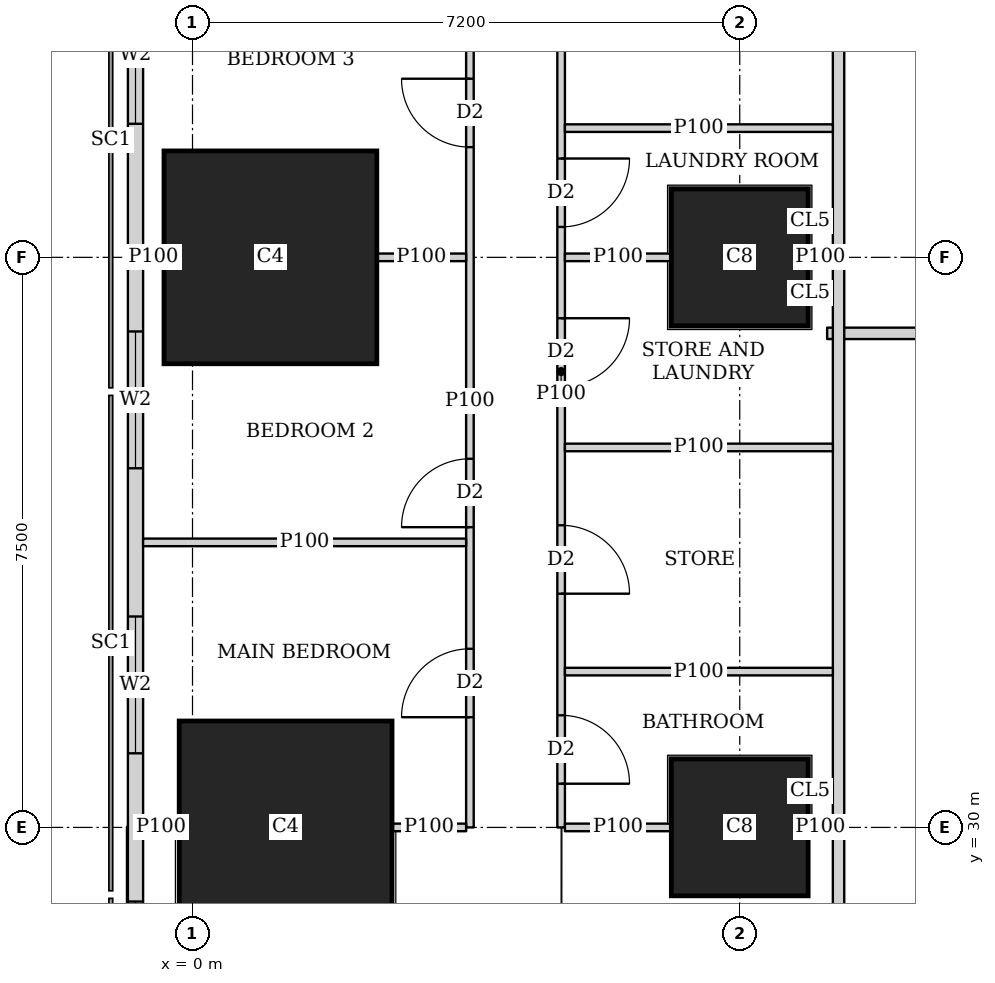
"""IFC4 building model, lengths in metres.
Left out: names, types, materials, properties, quantities, classifications, styles, units other than length and angle.
Written with IfcOpenShell. Run it as: python <this file> out.ifc"""

import sys

from ifc_helpers import new_model, si_unit, direction, frame, frame_2d, origin, origin_2d, place, context, subcontext, project, spatial, rectangle, extrude, element, fill, save


model = new_model("IFC4")
c1 = context("Model", 3, precision=1e-05, world=origin(), true_north=direction((0.0, 1.0)))
c2 = subcontext(c1, "Body", "Model", "MODEL_VIEW")
j1 = project(units=[si_unit("LENGTHUNIT", "METRE"), si_unit("PLANEANGLEUNIT", "RADIAN")], contexts=[c1])
p1 = place(None, origin())
s1 = spatial("IfcSite", under=j1, at=p1, CompositionType="ELEMENT")
p2 = place(p1, origin())
s2 = spatial("IfcBuilding", under=s1, at=p2, CompositionType="ELEMENT")
p3 = place(p2, frame((0.0, 0.0, 65.0)))
s3 = spatial("IfcBuildingStorey", under=s2, at=p3, CompositionType="ELEMENT", Elevation=65.0)
p4 = place(p3, frame((1.225, 30.0, 0.0), z_axis=(0.0, 0.0, 1.0), x_axis=(1.0, 0.0, 0.0)))
e1 = element("IfcColumn", 1, at=p4, inside=s3, PredefinedType="COLUMN", context=c2, shape_type="SweptSolid", body=[
    extrude(rectangle(XDim=2.8, YDim=2.8, at=origin_2d()), origin(), (0.0, 0.0, 1.0), 3.75),
])
p5 = place(p3, frame((7.2, 30.0, 0.0), z_axis=(0.0, 0.0, 1.0), x_axis=(1.0, 0.0, 0.0)))
e2 = element("IfcColumn", 2, at=p5, inside=s3, PredefinedType="COLUMN", context=c2, shape_type="SweptSolid", body=[
    extrude(rectangle(XDim=1.8, YDim=1.8, at=origin_2d()), origin(), (0.0, 0.0, 1.0), 3.75),
])
p6 = place(p3, frame((1.025, 37.5, 0.0), z_axis=(0.0, 0.0, 1.0), x_axis=(1.0, 0.0, 0.0)))
e3 = element("IfcColumn", 3, at=p6, inside=s3, PredefinedType="COLUMN", context=c2, shape_type="SweptSolid", body=[
    extrude(rectangle(XDim=2.8, YDim=2.8, at=origin_2d()), origin(), (0.0, 0.0, 1.0), 3.75),
])
p7 = place(p3, frame((7.2, 37.5, 0.0), z_axis=(0.0, 0.0, 1.0), x_axis=(1.0, 0.0, 0.0)))
e4 = element("IfcColumn", 4, at=p7, inside=s3, PredefinedType="COLUMN", context=c2, shape_type="SweptSolid", body=[
    extrude(rectangle(XDim=1.8, YDim=1.8, at=origin_2d()), origin(), (0.0, 0.0, 1.0), 3.75),
])
p8 = place(p3, frame((-0.75, 42.837, 0.0), z_axis=(0.0, 0.0, 1.0), x_axis=(0.0, -1.0, 0.0)))
e5 = element("IfcWall", 5, at=p8, inside=s3, PredefinedType="SOLIDWALL", context=c2, shape_type="SweptSolid", body=[
    extrude(rectangle(XDim=40.674, YDim=0.2, at=frame_2d((20.337, 0.0))), origin(), (0.0, 0.0, 1.0), 3.5),
])
p9 = place(p8, frame((1.78, 0.0, 0.9)))
e6 = element("IfcOpeningElement", 6, at=p9, cuts=e5, PredefinedType="OPENING", context=c2, shape_type="SweptSolid", body=[
    extrude(rectangle(XDim=1.8, YDim=1.5, at=frame_2d((0.9, 0.75))), frame((0.0, 0.11, 0.0), z_axis=(0.0, -1.0, 0.0), x_axis=(1.0, 0.0, 0.0)), (0.0, 0.0, 1.0), 0.22),
])
p10 = place(p8, frame((6.312, 0.0, 0.9)))
e7 = element("IfcOpeningElement", 7, at=p10, cuts=e5, PredefinedType="OPENING", context=c2, shape_type="SweptSolid", body=[
    extrude(rectangle(XDim=1.8, YDim=1.5, at=frame_2d((0.9, 0.75))), frame((0.0, 0.11, 0.0), z_axis=(0.0, -1.0, 0.0), x_axis=(1.0, 0.0, 0.0)), (0.0, 0.0, 1.0), 0.22),
])
p11 = place(p8, frame((10.062, 0.0, 0.9)))
e8 = element("IfcOpeningElement", 8, at=p11, cuts=e5, PredefinedType="OPENING", context=c2, shape_type="SweptSolid", body=[
    extrude(rectangle(XDim=1.8, YDim=1.5, at=frame_2d((0.9, 0.75))), frame((0.0, 0.11, 0.0), z_axis=(0.0, -1.0, 0.0), x_axis=(1.0, 0.0, 0.0)), (0.0, 0.0, 1.0), 0.22),
])
p12 = place(p8, frame((13.812, 0.0, 0.9)))
e9 = element("IfcOpeningElement", 9, at=p12, cuts=e5, PredefinedType="OPENING", context=c2, shape_type="SweptSolid", body=[
    extrude(rectangle(XDim=1.8, YDim=1.5, at=frame_2d((0.9, 0.75))), frame((0.0, 0.11, 0.0), z_axis=(0.0, -1.0, 0.0), x_axis=(1.0, 0.0, 0.0)), (0.0, 0.0, 1.0), 0.22),
])
p13 = place(p8, frame((17.562, 0.0, 0.9)))
e10 = element("IfcOpeningElement", 10, at=p13, cuts=e5, PredefinedType="OPENING", context=c2, shape_type="SweptSolid", body=[
    extrude(rectangle(XDim=1.8, YDim=1.5, at=frame_2d((0.9, 0.75))), frame((0.0, 0.11, 0.0), z_axis=(0.0, -1.0, 0.0), x_axis=(1.0, 0.0, 0.0)), (0.0, 0.0, 1.0), 0.22),
])
p14 = place(p8, frame((21.312, 0.0, 0.9)))
e11 = element("IfcOpeningElement", 11, at=p14, cuts=e5, PredefinedType="OPENING", context=c2, shape_type="SweptSolid", body=[
    extrude(rectangle(XDim=1.8, YDim=1.5, at=frame_2d((0.9, 0.75))), frame((0.0, 0.11, 0.0), z_axis=(0.0, -1.0, 0.0), x_axis=(1.0, 0.0, 0.0)), (0.0, 0.0, 1.0), 0.22),
])
p15 = place(p8, frame((25.062, 0.0, 0.9)))
e12 = element("IfcOpeningElement", 12, at=p15, cuts=e5, PredefinedType="OPENING", context=c2, shape_type="SweptSolid", body=[
    extrude(rectangle(XDim=1.8, YDim=1.5, at=frame_2d((0.9, 0.75))), frame((0.0, 0.11, 0.0), z_axis=(0.0, -1.0, 0.0), x_axis=(1.0, 0.0, 0.0)), (0.0, 0.0, 1.0), 0.22),
])
p16 = place(p8, frame((28.812, 0.0, 0.9)))
e13 = element("IfcOpeningElement", 13, at=p16, cuts=e5, PredefinedType="OPENING", context=c2, shape_type="SweptSolid", body=[
    extrude(rectangle(XDim=1.8, YDim=1.5, at=frame_2d((0.9, 0.75))), frame((0.0, 0.11, 0.0), z_axis=(0.0, -1.0, 0.0), x_axis=(1.0, 0.0, 0.0)), (0.0, 0.0, 1.0), 0.22),
])
p17 = place(p8, frame((32.562, 0.0, 0.9)))
e14 = element("IfcOpeningElement", 14, at=p17, cuts=e5, PredefinedType="OPENING", context=c2, shape_type="SweptSolid", body=[
    extrude(rectangle(XDim=1.8, YDim=1.5, at=frame_2d((0.9, 0.75))), frame((0.0, 0.11, 0.0), z_axis=(0.0, -1.0, 0.0), x_axis=(1.0, 0.0, 0.0)), (0.0, 0.0, 1.0), 0.22),
])
p18 = place(p8, frame((37.094, 0.0, 0.9)))
e15 = element("IfcOpeningElement", 15, at=p18, cuts=e5, PredefinedType="OPENING", context=c2, shape_type="SweptSolid", body=[
    extrude(rectangle(XDim=1.8, YDim=1.5, at=frame_2d((0.9, 0.75))), frame((0.0, 0.11, 0.0), z_axis=(0.0, -1.0, 0.0), x_axis=(1.0, 0.0, 0.0)), (0.0, 0.0, 1.0), 0.22),
])
p19 = place(p3, frame((8.5, 2.426, 0.0), z_axis=(0.0, 0.0, 1.0), x_axis=(0.0, 1.0, 0.0)))
e16 = element("IfcWall", 16, at=p19, inside=s3, PredefinedType="SOLIDWALL", context=c2, shape_type="SweptSolid", body=[
    extrude(rectangle(XDim=40.173, YDim=0.15, at=frame_2d((20.086, 0.0))), origin(), (0.0, 0.0, 1.0), 3.5),
])
p20 = place(p19, frame((6.661, 0.0, 0.0)))
e17 = element("IfcOpeningElement", 17, at=p20, cuts=e16, PredefinedType="OPENING", context=c2, shape_type="SweptSolid", body=[
    extrude(rectangle(XDim=1.0, YDim=2.1, at=frame_2d((0.5, 1.05))), frame((0.0, 0.085, 0.0), z_axis=(0.0, -1.0, 0.0), x_axis=(1.0, 0.0, 0.0)), (0.0, 0.0, 1.0), 0.17),
])
p21 = place(p19, frame((9.986, 0.0, 0.0)))
e18 = element("IfcOpeningElement", 18, at=p21, cuts=e16, PredefinedType="OPENING", context=c2, shape_type="SweptSolid", body=[
    extrude(rectangle(XDim=1.0, YDim=2.1, at=frame_2d((0.5, 1.05))), frame((0.0, 0.085, 0.0), z_axis=(0.0, -1.0, 0.0), x_axis=(1.0, 0.0, 0.0)), (0.0, 0.0, 1.0), 0.17),
])
p22 = place(p19, frame((17.487, 0.0, 0.0)))
e19 = element("IfcOpeningElement", 19, at=p22, cuts=e16, PredefinedType="OPENING", context=c2, shape_type="SweptSolid", body=[
    extrude(rectangle(XDim=1.0, YDim=2.1, at=frame_2d((0.5, 1.05))), frame((0.0, 0.085, 0.0), z_axis=(0.0, -1.0, 0.0), x_axis=(1.0, 0.0, 0.0)), (0.0, 0.0, 1.0), 0.17),
])
p23 = place(p19, frame((24.987, 0.0, 0.0)))
e20 = element("IfcOpeningElement", 20, at=p23, cuts=e16, PredefinedType="OPENING", context=c2, shape_type="SweptSolid", body=[
    extrude(rectangle(XDim=1.0, YDim=2.1, at=frame_2d((0.5, 1.05))), frame((0.0, 0.085, 0.0), z_axis=(0.0, -1.0, 0.0), x_axis=(1.0, 0.0, 0.0)), (0.0, 0.0, 1.0), 0.17),
])
p24 = place(p3, frame((8.35, 36.5, 0.0), z_axis=(0.0, 0.0, 1.0), x_axis=(1.0, 0.0, 0.0)))
e21 = element("IfcWall", 21, at=p24, inside=s3, PredefinedType="SOLIDWALL", context=c2, shape_type="SweptSolid", body=[
    extrude(rectangle(XDim=26.415, YDim=0.15, at=frame_2d((13.208, 0.0))), origin(), (0.0, 0.0, 1.0), 3.5),
])
p25 = place(p24, frame((2.6, 0.0, 0.0)))
e22 = element("IfcOpeningElement", 22, at=p25, cuts=e21, PredefinedType="OPENING", context=c2, shape_type="SweptSolid", body=[
    extrude(rectangle(XDim=1.0, YDim=2.1, at=frame_2d((0.5, 1.05))), frame((0.0, 0.085, 0.0), z_axis=(0.0, -1.0, 0.0), x_axis=(1.0, 0.0, 0.0)), (0.0, 0.0, 1.0), 0.17),
])
p26 = place(p24, frame((10.949, 0.0, 0.0)))
e23 = element("IfcOpeningElement", 23, at=p26, cuts=e21, PredefinedType="OPENING", context=c2, shape_type="SweptSolid", body=[
    extrude(rectangle(XDim=1.0, YDim=2.1, at=frame_2d((0.5, 1.05))), frame((0.0, 0.085, 0.0), z_axis=(0.0, -1.0, 0.0), x_axis=(1.0, 0.0, 0.0)), (0.0, 0.0, 1.0), 0.17),
])
p27 = place(p24, frame((18.149, 0.0, 0.0)))
e24 = element("IfcOpeningElement", 24, at=p27, cuts=e21, PredefinedType="OPENING", context=c2, shape_type="SweptSolid", body=[
    extrude(rectangle(XDim=1.0, YDim=2.1, at=frame_2d((0.5, 1.05))), frame((0.0, 0.085, 0.0), z_axis=(0.0, -1.0, 0.0), x_axis=(1.0, 0.0, 0.0)), (0.0, 0.0, 1.0), 0.17),
])
p28 = place(p3, frame((3.65, 30.0, 0.0), z_axis=(0.0, 0.0, 1.0), x_axis=(0.0, 1.0, 0.0)))
e25 = element("IfcWall", 25, at=p28, inside=s3, PredefinedType="PARTITIONING", context=c2, shape_type="SweptSolid", body=[
    extrude(rectangle(XDim=11.213, YDim=0.1, at=frame_2d((5.606, 0.0))), origin(), (0.0, 0.0, 1.0), 3.5),
])
p29 = place(p28, frame((1.45, 0.0, 0.0)))
e26 = element("IfcOpeningElement", 26, at=p29, cuts=e25, PredefinedType="OPENING", context=c2, shape_type="SweptSolid", body=[
    extrude(rectangle(XDim=0.9, YDim=2.1, at=frame_2d((0.45, 1.05))), frame((0.0, 0.06, 0.0), z_axis=(0.0, -1.0, 0.0), x_axis=(1.0, 0.0, 0.0)), (0.0, 0.0, 1.0), 0.12),
])
p30 = place(p28, frame((3.95, 0.0, 0.0)))
e27 = element("IfcOpeningElement", 27, at=p30, cuts=e25, PredefinedType="OPENING", context=c2, shape_type="SweptSolid", body=[
    extrude(rectangle(XDim=0.9, YDim=2.1, at=frame_2d((0.45, 1.05))), frame((0.0, 0.06, 0.0), z_axis=(0.0, -1.0, 0.0), x_axis=(1.0, 0.0, 0.0)), (0.0, 0.0, 1.0), 0.12),
])
p31 = place(p28, frame((8.95, 0.0, 0.0)))
e28 = element("IfcOpeningElement", 28, at=p31, cuts=e25, PredefinedType="OPENING", context=c2, shape_type="SweptSolid", body=[
    extrude(rectangle(XDim=0.9, YDim=2.1, at=frame_2d((0.45, 1.05))), frame((0.0, 0.06, 0.0), z_axis=(0.0, -1.0, 0.0), x_axis=(1.0, 0.0, 0.0)), (0.0, 0.0, 1.0), 0.12),
])
p32 = place(p3, frame((4.85, 30.0, 0.0), z_axis=(0.0, 0.0, 1.0), x_axis=(0.0, 1.0, 0.0)))
e29 = element("IfcWall", 29, at=p32, inside=s3, PredefinedType="PARTITIONING", context=c2, shape_type="SweptSolid", body=[
    extrude(rectangle(XDim=11.994, YDim=0.1, at=frame_2d((5.997, 0.0))), origin(), (0.0, 0.0, 1.0), 3.5),
])
p33 = place(p32, frame((0.575, 0.0, 0.0)))
e30 = element("IfcOpeningElement", 30, at=p33, cuts=e29, PredefinedType="OPENING", context=c2, shape_type="SweptSolid", body=[
    extrude(rectangle(XDim=0.9, YDim=2.1, at=frame_2d((0.45, 1.05))), frame((0.0, 0.06, 0.0), z_axis=(0.0, -1.0, 0.0), x_axis=(1.0, 0.0, 0.0)), (0.0, 0.0, 1.0), 0.12),
])
p34 = place(p32, frame((5.799, 0.0, 0.0)))
e31 = element("IfcOpeningElement", 31, at=p34, cuts=e29, PredefinedType="OPENING", context=c2, shape_type="SweptSolid", body=[
    extrude(rectangle(XDim=0.9, YDim=2.1, at=frame_2d((0.45, 1.05))), frame((0.0, 0.06, 0.0), z_axis=(0.0, -1.0, 0.0), x_axis=(1.0, 0.0, 0.0)), (0.0, 0.0, 1.0), 0.12),
])
p35 = place(p32, frame((7.9, 0.0, 0.0)))
e32 = element("IfcOpeningElement", 32, at=p35, cuts=e29, PredefinedType="OPENING", context=c2, shape_type="SweptSolid", body=[
    extrude(rectangle(XDim=0.9, YDim=2.1, at=frame_2d((0.45, 1.05))), frame((0.0, 0.06, 0.0), z_axis=(0.0, -1.0, 0.0), x_axis=(1.0, 0.0, 0.0)), (0.0, 0.0, 1.0), 0.12),
])
p36 = place(p32, frame((3.075, 0.0, 0.0)))
e33 = element("IfcOpeningElement", 33, at=p36, cuts=e29, PredefinedType="OPENING", context=c2, shape_type="SweptSolid", body=[
    extrude(rectangle(XDim=0.9, YDim=2.1, at=frame_2d((0.45, 1.05))), frame((0.0, 0.06, 0.0), z_axis=(0.0, -1.0, 0.0), x_axis=(1.0, 0.0, 0.0)), (0.0, 0.0, 1.0), 0.12),
])
p37 = place(p32, frame((10.3, 0.0, 0.0)))
e34 = element("IfcOpeningElement", 34, at=p37, cuts=e29, PredefinedType="OPENING", context=c2, shape_type="SweptSolid", body=[
    extrude(rectangle(XDim=0.9, YDim=2.1, at=frame_2d((0.45, 1.05))), frame((0.0, 0.06, 0.0), z_axis=(0.0, -1.0, 0.0), x_axis=(1.0, 0.0, 0.0)), (0.0, 0.0, 1.0), 0.12),
])
p38 = place(p3, frame((-0.65, 30.0, 0.0), z_axis=(0.0, 0.0, 1.0), x_axis=(1.0, 0.0, 0.0)))
e35 = element("IfcWall", 35, at=p38, inside=s3, PredefinedType="PARTITIONING", context=c2, shape_type="SweptSolid", body=[
    extrude(rectangle(XDim=0.474, YDim=0.1, at=frame_2d((0.237, 0.0))), origin(), (0.0, 0.0, 1.0), 3.5),
])
p39 = place(p3, frame((2.626, 30.0, 0.0), z_axis=(0.0, 0.0, 1.0), x_axis=(1.0, 0.0, 0.0)))
e36 = element("IfcWall", 36, at=p39, inside=s3, PredefinedType="PARTITIONING", context=c2, shape_type="SweptSolid", body=[
    extrude(rectangle(XDim=0.974, YDim=0.1, at=frame_2d((0.487, 0.0))), origin(), (0.0, 0.0, 1.0), 3.5),
])
p40 = place(p3, frame((-0.65, 33.75, 0.0), z_axis=(0.0, 0.0, 1.0), x_axis=(1.0, 0.0, 0.0)))
e37 = element("IfcWall", 37, at=p40, inside=s3, PredefinedType="PARTITIONING", context=c2, shape_type="SweptSolid", body=[
    extrude(rectangle(XDim=4.25, YDim=0.1, at=frame_2d((2.125, 0.0))), origin(), (0.0, 0.0, 1.0), 2.05),
])
p41 = place(p3, frame((-0.65, 37.5, 0.0), z_axis=(0.0, 0.0, 1.0), x_axis=(1.0, 0.0, 0.0)))
e38 = element("IfcWall", 38, at=p41, inside=s3, PredefinedType="PARTITIONING", context=c2, shape_type="SweptSolid", body=[
    extrude(rectangle(XDim=0.274, YDim=0.1, at=frame_2d((0.137, 0.0))), origin(), (0.0, 0.0, 1.0), 3.5),
])
p42 = place(p3, frame((2.426, 37.5, 0.0), z_axis=(0.0, 0.0, 1.0), x_axis=(1.0, 0.0, 0.0)))
e39 = element("IfcWall", 39, at=p42, inside=s3, PredefinedType="PARTITIONING", context=c2, shape_type="SweptSolid", body=[
    extrude(rectangle(XDim=1.174, YDim=0.1, at=frame_2d((0.587, 0.0))), origin(), (0.0, 0.0, 1.0), 2.05),
])
p43 = place(p3, frame((4.9, 30.0, 0.0), z_axis=(0.0, 0.0, 1.0), x_axis=(1.0, 0.0, 0.0)))
e40 = element("IfcWall", 40, at=p43, inside=s3, PredefinedType="PARTITIONING", context=c2, shape_type="SweptSolid", body=[
    extrude(rectangle(XDim=1.399, YDim=0.1, at=frame_2d((0.7, 0.0))), origin(), (0.0, 0.0, 1.0), 3.5),
])
p44 = place(p3, frame((8.101, 30.0, 0.0), z_axis=(0.0, 0.0, 1.0), x_axis=(1.0, 0.0, 0.0)))
e41 = element("IfcWall", 41, at=p44, inside=s3, PredefinedType="PARTITIONING", context=c2, shape_type="SweptSolid", body=[
    extrude(rectangle(XDim=0.324, YDim=0.1, at=frame_2d((0.162, 0.0))), origin(), (0.0, 0.0, 1.0), 3.5),
])
p45 = place(p3, frame((4.9, 34.999, 0.0), z_axis=(0.0, 0.0, 1.0), x_axis=(1.0, 0.0, 0.0)))
e42 = element("IfcWall", 42, at=p45, inside=s3, PredefinedType="PARTITIONING", context=c2, shape_type="SweptSolid", body=[
    extrude(rectangle(XDim=3.525, YDim=0.1, at=frame_2d((1.763, 0.0))), origin(), (0.0, 0.0, 1.0), 3.5),
])
p46 = place(p3, frame((4.9, 37.5, 0.0), z_axis=(0.0, 0.0, 1.0), x_axis=(1.0, 0.0, 0.0)))
e43 = element("IfcWall", 43, at=p46, inside=s3, PredefinedType="PARTITIONING", context=c2, shape_type="SweptSolid", body=[
    extrude(rectangle(XDim=1.399, YDim=0.1, at=frame_2d((0.7, 0.0))), origin(), (0.0, 0.0, 1.0), 3.5),
])
p47 = place(p3, frame((8.101, 37.5, 0.0), z_axis=(0.0, 0.0, 1.0), x_axis=(1.0, 0.0, 0.0)))
e44 = element("IfcWall", 44, at=p47, inside=s3, PredefinedType="PARTITIONING", context=c2, shape_type="SweptSolid", body=[
    extrude(rectangle(XDim=0.324, YDim=0.1, at=frame_2d((0.162, 0.0))), origin(), (0.0, 0.0, 1.0), 3.5),
])
for number, where, z_axis, x_axis in (
    (45, (4.9, 32.05, 0.0), (0.0, 0.0, 1.0), (1.0, 0.0, 0.0)),
    (46, (4.9, 39.2, 0.0), (0.0, 0.0, 1.0), (1.0, 0.0, 0.0)),
):
    element("IfcWall", number, at=place(p3, frame(where, z_axis=z_axis, x_axis=x_axis)), inside=s3, PredefinedType="PARTITIONING", context=c2, shape_type="SweptSolid", body=[
        extrude(rectangle(XDim=3.525, YDim=0.1, at=frame_2d((1.763, 0.0))), origin(), (0.0, 0.0, 1.0), 3.5),
    ])
p48 = place(p9, origin())
e47 = element("IfcWindow", 47, at=p48, inside=s3, PartitioningType="SINGLE_PANEL", PredefinedType="WINDOW", context=c2, shape_type="SweptSolid", body=[
    extrude(rectangle(XDim=1.8, YDim=1.5, at=frame_2d((0.9, 0.75))), frame((0.0, 0.03, 0.0), z_axis=(0.0, -1.0, 0.0), x_axis=(1.0, 0.0, 0.0)), (0.0, 0.0, 1.0), 0.06),
])
fill(e6, e47)
p49 = place(p10, origin())
e48 = element("IfcWindow", 48, at=p49, inside=s3, PartitioningType="SINGLE_PANEL", PredefinedType="WINDOW", context=c2, shape_type="SweptSolid", body=[
    extrude(rectangle(XDim=1.8, YDim=1.5, at=frame_2d((0.9, 0.75))), frame((0.0, 0.03, 0.0), z_axis=(0.0, -1.0, 0.0), x_axis=(1.0, 0.0, 0.0)), (0.0, 0.0, 1.0), 0.06),
])
fill(e7, e48)
p50 = place(p11, origin())
e49 = element("IfcWindow", 49, at=p50, inside=s3, PartitioningType="SINGLE_PANEL", PredefinedType="WINDOW", context=c2, shape_type="SweptSolid", body=[
    extrude(rectangle(XDim=1.8, YDim=1.5, at=frame_2d((0.9, 0.75))), frame((0.0, 0.03, 0.0), z_axis=(0.0, -1.0, 0.0), x_axis=(1.0, 0.0, 0.0)), (0.0, 0.0, 1.0), 0.06),
])
fill(e8, e49)
p51 = place(p12, origin())
e50 = element("IfcWindow", 50, at=p51, inside=s3, PartitioningType="SINGLE_PANEL", PredefinedType="WINDOW", context=c2, shape_type="SweptSolid", body=[
    extrude(rectangle(XDim=1.8, YDim=1.5, at=frame_2d((0.9, 0.75))), frame((0.0, 0.03, 0.0), z_axis=(0.0, -1.0, 0.0), x_axis=(1.0, 0.0, 0.0)), (0.0, 0.0, 1.0), 0.06),
])
fill(e9, e50)
p52 = place(p29, origin())
e51 = element("IfcDoor", 51, at=p52, inside=s3, OperationType="SINGLE_SWING_LEFT", PredefinedType="DOOR", context=c2, shape_type="SweptSolid", body=[
    extrude(rectangle(XDim=0.9, YDim=2.1, at=frame_2d((0.45, 1.05))), frame((0.0, 0.025, 0.0), z_axis=(0.0, -1.0, 0.0), x_axis=(1.0, 0.0, 0.0)), (0.0, 0.0, 1.0), 0.05),
])
fill(e26, e51)
p53 = place(p30, origin())
e52 = element("IfcDoor", 52, at=p53, inside=s3, OperationType="SINGLE_SWING_LEFT", PredefinedType="DOOR", context=c2, shape_type="SweptSolid", body=[
    extrude(rectangle(XDim=0.9, YDim=2.1, at=frame_2d((0.45, 1.05))), frame((0.0, 0.025, 0.0), z_axis=(0.0, -1.0, 0.0), x_axis=(1.0, 0.0, 0.0)), (0.0, 0.0, 1.0), 0.05),
])
fill(e27, e52)
p54 = place(p31, origin())
e53 = element("IfcDoor", 53, at=p54, inside=s3, OperationType="SINGLE_SWING_RIGHT", PredefinedType="DOOR", context=c2, shape_type="SweptSolid", body=[
    extrude(rectangle(XDim=0.9, YDim=2.1, at=frame_2d((0.45, 1.05))), frame((0.0, 0.025, 0.0), z_axis=(0.0, -1.0, 0.0), x_axis=(1.0, 0.0, 0.0)), (0.0, 0.0, 1.0), 0.05),
])
fill(e28, e53)
p55 = place(p33, origin())
e54 = element("IfcDoor", 54, at=p55, inside=s3, OperationType="SINGLE_SWING_RIGHT", PredefinedType="DOOR", context=c2, shape_type="SweptSolid", body=[
    extrude(rectangle(XDim=0.9, YDim=2.1, at=frame_2d((0.45, 1.05))), frame((0.0, 0.025, 0.0), z_axis=(0.0, -1.0, 0.0), x_axis=(1.0, 0.0, 0.0)), (0.0, 0.0, 1.0), 0.05),
])
fill(e30, e54)
p56 = place(p34, origin())
e55 = element("IfcDoor", 55, at=p56, inside=s3, OperationType="SINGLE_SWING_LEFT", PredefinedType="DOOR", context=c2, shape_type="SweptSolid", body=[
    extrude(rectangle(XDim=0.9, YDim=2.1, at=frame_2d((0.45, 1.05))), frame((0.0, 0.025, 0.0), z_axis=(0.0, -1.0, 0.0), x_axis=(1.0, 0.0, 0.0)), (0.0, 0.0, 1.0), 0.05),
])
fill(e31, e55)
p57 = place(p35, origin())
e56 = element("IfcDoor", 56, at=p57, inside=s3, OperationType="SINGLE_SWING_LEFT", PredefinedType="DOOR", context=c2, shape_type="SweptSolid", body=[
    extrude(rectangle(XDim=0.9, YDim=2.1, at=frame_2d((0.45, 1.05))), frame((0.0, 0.025, 0.0), z_axis=(0.0, -1.0, 0.0), x_axis=(1.0, 0.0, 0.0)), (0.0, 0.0, 1.0), 0.05),
])
fill(e32, e56)
p58 = place(p36, origin())
e57 = element("IfcDoor", 57, at=p58, inside=s3, OperationType="SINGLE_SWING_RIGHT", PredefinedType="DOOR", context=c2, shape_type="SweptSolid", body=[
    extrude(rectangle(XDim=0.9, YDim=2.1, at=frame_2d((0.45, 1.05))), frame((0.0, 0.025, 0.0), z_axis=(0.0, -1.0, 0.0), x_axis=(1.0, 0.0, 0.0)), (0.0, 0.0, 1.0), 0.05),
])
fill(e33, e57)
save(model, sys.argv[1])
